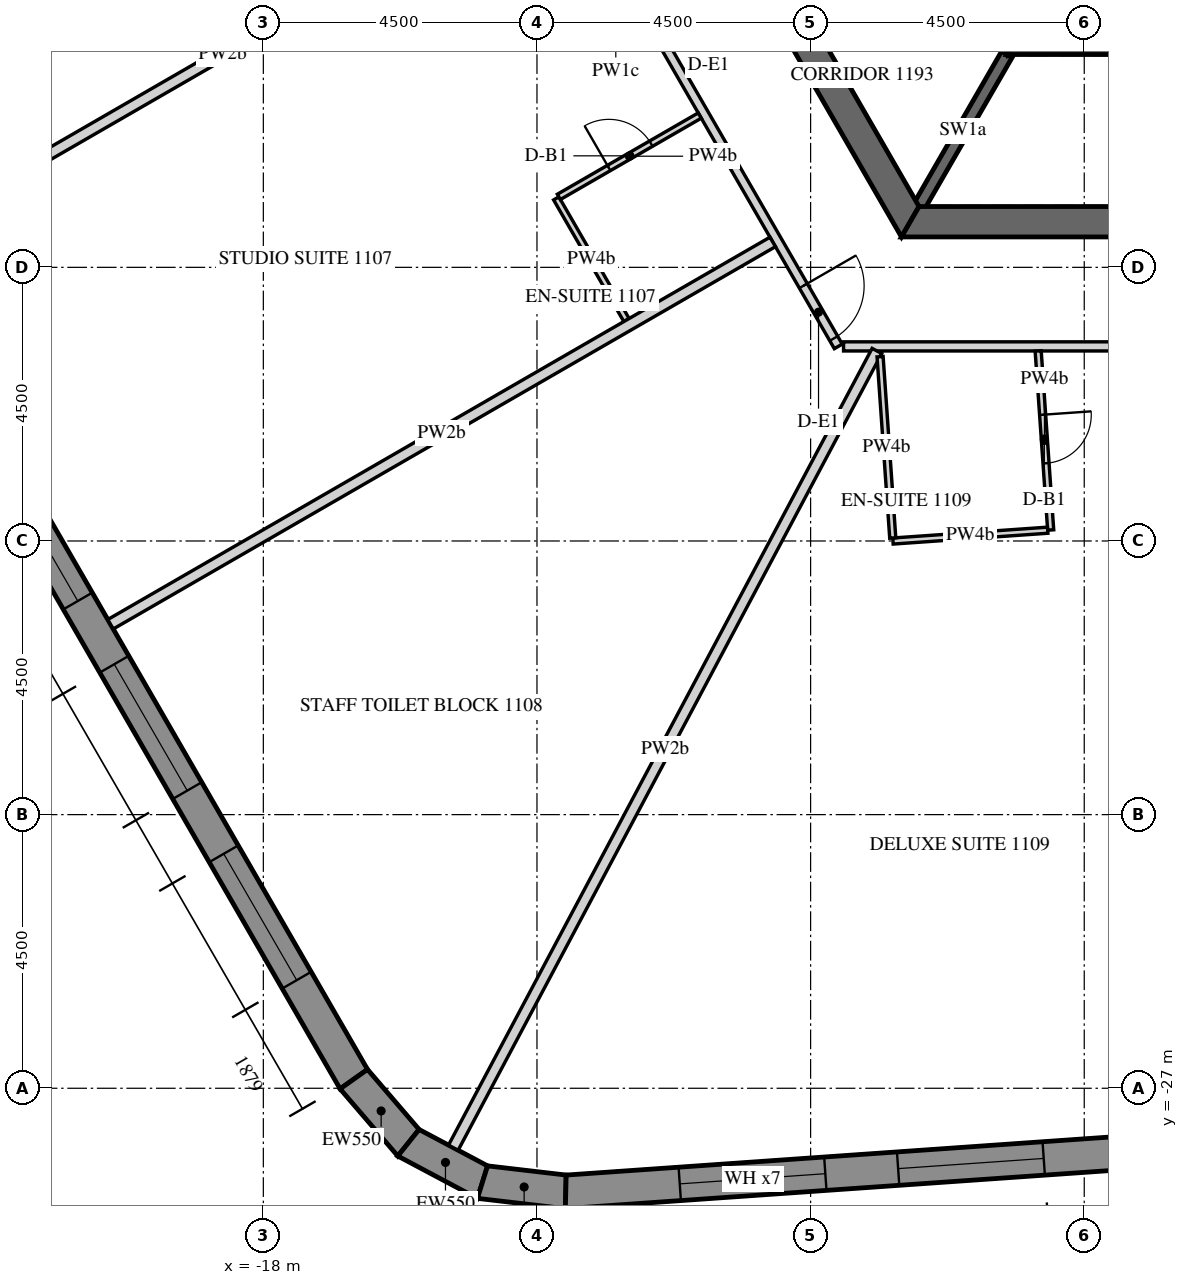
"""IFC4 building model, lengths in metres.
Left out: names, types, materials, properties, quantities, classifications, styles, units other than length and angle.
Written with IfcOpenShell. Run it as: python <this file> out.ifc"""

import sys

from ifc_helpers import new_model, si_unit, direction, frame, frame_2d, origin, place, context, subcontext, project, spatial, polyline, rectangle, outline, extrude, element, fill, save


model = new_model("IFC4")
c1 = context("Model", 3, precision=1e-05, world=origin(), true_north=direction((0.0, 1.0)))
c2 = subcontext(c1, "Body", "Model", "MODEL_VIEW")
j1 = project(units=[si_unit("LENGTHUNIT", "METRE"), si_unit("PLANEANGLEUNIT", "RADIAN")], contexts=[c1])
p1 = place(None, origin())
s1 = spatial("IfcSite", under=j1, at=p1, CompositionType="ELEMENT")
p2 = place(p1, origin())
s2 = spatial("IfcBuilding", under=s1, at=p2, CompositionType="ELEMENT")
p3 = place(p2, frame((0.0, 0.0, 156.6)))
s3 = spatial("IfcBuildingStorey", under=s2, at=p3, CompositionType="ELEMENT", Elevation=156.6)
p4 = place(p3, frame((-30.391, -2.811, -0.15), z_axis=(0.0, 0.0, 1.0), x_axis=(0.499998569178, -0.866026229868, 0.0)))
e1 = element("IfcWall", 1, at=p4, inside=s3, PredefinedType="SOLIDWALL", context=c2, shape_type="SweptSolid", body=[
    extrude(outline(polyline([(-0.022, -0.275), (27.783, -0.275), (27.732, 0.275), (0.022, 0.275), (-0.022, -0.275)])), origin(), (0.0, 0.0, 1.0), 3.9),
])
p5 = place(p4, frame((1.879, 0.0, 1.05)))
e2 = element("IfcOpeningElement", 2, at=p5, cuts=e1, PredefinedType="OPENING", context=c2, shape_type="SweptSolid", body=[
    extrude(rectangle(XDim=2.4, YDim=2.4, at=frame_2d((1.2, 1.2))), frame((0.0, 0.285, 0.0), z_axis=(0.0, -1.0, 0.0), x_axis=(1.0, 0.0, 0.0)), (0.0, 0.0, 1.0), 0.57),
])
p6 = place(p4, frame((5.479, 0.0, 1.05)))
e3 = element("IfcOpeningElement", 3, at=p6, cuts=e1, PredefinedType="OPENING", context=c2, shape_type="SweptSolid", body=[
    extrude(rectangle(XDim=2.4, YDim=2.4, at=frame_2d((1.2, 1.2))), frame((0.0, 0.285, 0.0), z_axis=(0.0, -1.0, 0.0), x_axis=(1.0, 0.0, 0.0)), (0.0, 0.0, 1.0), 0.57),
])
p7 = place(p4, frame((9.079, 0.0, 1.05)))
e4 = element("IfcOpeningElement", 4, at=p7, cuts=e1, PredefinedType="OPENING", context=c2, shape_type="SweptSolid", body=[
    extrude(rectangle(XDim=2.4, YDim=2.4, at=frame_2d((1.2, 1.2))), frame((0.0, 0.285, 0.0), z_axis=(0.0, -1.0, 0.0), x_axis=(1.0, 0.0, 0.0)), (0.0, 0.0, 1.0), 0.57),
])
p8 = place(p4, frame((12.679, 0.0, 1.05)))
e5 = element("IfcOpeningElement", 5, at=p8, cuts=e1, PredefinedType="OPENING", context=c2, shape_type="SweptSolid", body=[
    extrude(rectangle(XDim=2.4, YDim=2.4, at=frame_2d((1.2, 1.2))), frame((0.0, 0.285, 0.0), z_axis=(0.0, -1.0, 0.0), x_axis=(1.0, 0.0, 0.0)), (0.0, 0.0, 1.0), 0.57),
])
p9 = place(p4, frame((16.279, 0.0, 1.05)))
e6 = element("IfcOpeningElement", 6, at=p9, cuts=e1, PredefinedType="OPENING", context=c2, shape_type="SweptSolid", body=[
    extrude(rectangle(XDim=2.4, YDim=2.4, at=frame_2d((1.2, 1.2))), frame((0.0, 0.285, 0.0), z_axis=(0.0, -1.0, 0.0), x_axis=(1.0, 0.0, 0.0)), (0.0, 0.0, 1.0), 0.57),
])
p10 = place(p4, frame((19.879, 0.0, 1.05)))
e7 = element("IfcOpeningElement", 7, at=p10, cuts=e1, PredefinedType="OPENING", context=c2, shape_type="SweptSolid", body=[
    extrude(rectangle(XDim=2.4, YDim=2.4, at=frame_2d((1.2, 1.2))), frame((0.0, 0.285, 0.0), z_axis=(0.0, -1.0, 0.0), x_axis=(1.0, 0.0, 0.0)), (0.0, 0.0, 1.0), 0.57),
])
p11 = place(p4, frame((23.479, 0.0, 1.05)))
e8 = element("IfcOpeningElement", 8, at=p11, cuts=e1, PredefinedType="OPENING", context=c2, shape_type="SweptSolid", body=[
    extrude(rectangle(XDim=2.4, YDim=2.4, at=frame_2d((1.2, 1.2))), frame((0.0, 0.285, 0.0), z_axis=(0.0, -1.0, 0.0), x_axis=(1.0, 0.0, 0.0)), (0.0, 0.0, 1.0), 0.57),
])
p12 = place(p3, frame((-16.512, -26.85, -0.15), z_axis=(0.0, 0.0, 1.0), x_axis=(0.651621950847, -0.758543890078, 0.0)))
e9 = element("IfcWall", 9, at=p12, inside=s3, PredefinedType="SOLIDWALL", context=c2, shape_type="SweptSolid", body=[
    extrude(outline(polyline([(-0.026, -0.275), (1.431, -0.275), (1.327, 0.275), (0.026, 0.275), (-0.026, -0.275)])), origin(), (0.0, 0.0, 1.0), 3.9),
])
p13 = place(p3, frame((-15.614, -27.896, -0.15), z_axis=(0.0, 0.0, 1.0), x_axis=(0.882994189209, -0.469383917304, 0.0)))
e10 = element("IfcWall", 10, at=p13, inside=s3, PredefinedType="SOLIDWALL", context=c2, shape_type="SweptSolid", body=[
    extrude(outline(polyline([(-0.052, -0.275), (1.431, -0.275), (1.327, 0.275), (0.052, 0.275), (-0.052, -0.275)])), origin(), (0.0, 0.0, 1.0), 3.9),
])
p14 = place(p3, frame((-14.396, -28.543, -0.15), z_axis=(0.0, 0.0, 1.0), x_axis=(0.993232537394, -0.11614269956, 0.0)))
e11 = element("IfcWall", 11, at=p14, inside=s3, PredefinedType="SOLIDWALL", context=c2, shape_type="SweptSolid", body=[
    extrude(outline(polyline([(-0.052, -0.275), (1.405, -0.275), (1.353, 0.275), (0.052, 0.275), (-0.052, -0.275)])), origin(), (0.0, 0.0, 1.0), 3.9),
])
p15 = place(p3, frame((-13.026, -28.704, -0.15), z_axis=(0.0, 0.0, 1.0), x_axis=(0.99756406806, 0.069756219185, 0.0)))
e12 = element("IfcWall", 12, at=p15, inside=s3, PredefinedType="SOLIDWALL", context=c2, shape_type="SweptSolid", body=[
    extrude(outline(polyline([(-0.026, -0.275), (27.78, -0.275), (27.735, 0.275), (0.026, 0.275), (-0.026, -0.275)])), origin(), (0.0, 0.0, 1.0), 3.9),
])
p16 = place(p15, frame((1.879, 0.0, 1.05)))
e13 = element("IfcOpeningElement", 13, at=p16, cuts=e12, PredefinedType="OPENING", context=c2, shape_type="SweptSolid", body=[
    extrude(rectangle(XDim=2.4, YDim=2.4, at=frame_2d((1.2, 1.2))), frame((0.0, 0.285, 0.0), z_axis=(0.0, -1.0, 0.0), x_axis=(1.0, 0.0, 0.0)), (0.0, 0.0, 1.0), 0.57),
])
p17 = place(p15, frame((5.479, 0.0, 1.05)))
e14 = element("IfcOpeningElement", 14, at=p17, cuts=e12, PredefinedType="OPENING", context=c2, shape_type="SweptSolid", body=[
    extrude(rectangle(XDim=2.4, YDim=2.4, at=frame_2d((1.2, 1.2))), frame((0.0, 0.285, 0.0), z_axis=(0.0, -1.0, 0.0), x_axis=(1.0, 0.0, 0.0)), (0.0, 0.0, 1.0), 0.57),
])
p18 = place(p15, frame((9.079, 0.0, 1.05)))
e15 = element("IfcOpeningElement", 15, at=p18, cuts=e12, PredefinedType="OPENING", context=c2, shape_type="SweptSolid", body=[
    extrude(rectangle(XDim=2.4, YDim=2.4, at=frame_2d((1.2, 1.2))), frame((0.0, 0.285, 0.0), z_axis=(0.0, -1.0, 0.0), x_axis=(1.0, 0.0, 0.0)), (0.0, 0.0, 1.0), 0.57),
])
p19 = place(p15, frame((12.679, 0.0, 1.05)))
e16 = element("IfcOpeningElement", 16, at=p19, cuts=e12, PredefinedType="OPENING", context=c2, shape_type="SweptSolid", body=[
    extrude(rectangle(XDim=2.4, YDim=2.4, at=frame_2d((1.2, 1.2))), frame((0.0, 0.285, 0.0), z_axis=(0.0, -1.0, 0.0), x_axis=(1.0, 0.0, 0.0)), (0.0, 0.0, 1.0), 0.57),
])
p20 = place(p15, frame((16.279, 0.0, 1.05)))
e17 = element("IfcOpeningElement", 17, at=p20, cuts=e12, PredefinedType="OPENING", context=c2, shape_type="SweptSolid", body=[
    extrude(rectangle(XDim=2.4, YDim=2.4, at=frame_2d((1.2, 1.2))), frame((0.0, 0.285, 0.0), z_axis=(0.0, -1.0, 0.0), x_axis=(1.0, 0.0, 0.0)), (0.0, 0.0, 1.0), 0.57),
])
p21 = place(p15, frame((19.879, 0.0, 1.05)))
e18 = element("IfcOpeningElement", 18, at=p21, cuts=e12, PredefinedType="OPENING", context=c2, shape_type="SweptSolid", body=[
    extrude(rectangle(XDim=2.4, YDim=2.4, at=frame_2d((1.2, 1.2))), frame((0.0, 0.285, 0.0), z_axis=(0.0, -1.0, 0.0), x_axis=(1.0, 0.0, 0.0)), (0.0, 0.0, 1.0), 0.57),
])
p22 = place(p15, frame((23.479, 0.0, 1.05)))
e19 = element("IfcOpeningElement", 19, at=p22, cuts=e12, PredefinedType="OPENING", context=c2, shape_type="SweptSolid", body=[
    extrude(rectangle(XDim=2.4, YDim=2.4, at=frame_2d((1.2, 1.2))), frame((0.0, 0.285, 0.0), z_axis=(0.0, -1.0, 0.0), x_axis=(1.0, 0.0, 0.0)), (0.0, 0.0, 1.0), 0.57),
])
p23 = place(p3, frame((-14.722, 0.0, -0.15), z_axis=(0.0, 0.0, 1.0), x_axis=(0.50000571537, -0.866022103989, 0.0)))
e20 = element("IfcWall", 20, at=p23, inside=s3, PredefinedType="SHEAR", context=c2, shape_type="SweptSolid", body=[
    extrude(outline(polyline([(-0.144, -0.25), (14.867, -0.25), (14.578, 0.25), (0.144, 0.25), (-0.144, -0.25)])), origin(), (0.0, 0.0, 1.0), 3.9),
])
p24 = place(p23, frame((6.432, 0.0, 0.15)))
e21 = element("IfcOpeningElement", 21, at=p24, cuts=e20, PredefinedType="OPENING", context=c2, shape_type="SweptSolid", body=[
    extrude(rectangle(XDim=1.8, YDim=2.4, at=frame_2d((0.9, 1.2))), frame((0.0, 0.26, 0.0), z_axis=(0.0, -1.0, 0.0), x_axis=(1.0, 0.0, 0.0)), (0.0, 0.0, 1.0), 0.52),
])
p25 = place(p3, frame((-7.361, -12.75, -0.15), z_axis=(0.0, 0.0, 1.0), x_axis=(1.0, 0.0, 0.0)))
e22 = element("IfcWall", 22, at=p25, inside=s3, PredefinedType="SHEAR", context=c2, shape_type="SweptSolid", body=[
    extrude(outline(polyline([(-0.144, -0.25), (14.866, -0.25), (14.578, 0.25), (0.144, 0.25), (-0.144, -0.25)])), origin(), (0.0, 0.0, 1.0), 3.9),
])
p26 = place(p25, frame((6.761, 0.0, 0.15)))
e23 = element("IfcOpeningElement", 23, at=p26, cuts=e22, PredefinedType="OPENING", context=c2, shape_type="SweptSolid", body=[
    extrude(rectangle(XDim=1.2, YDim=2.4, at=frame_2d((0.6, 1.2))), frame((0.0, 0.26, 0.0), z_axis=(0.0, -1.0, 0.0), x_axis=(1.0, 0.0, 0.0)), (0.0, 0.0, 1.0), 0.52),
])
p27 = place(p3, frame((-11.345, 0.0, -0.15), z_axis=(0.0, 0.0, 1.0), x_axis=(0.499995046907, -0.866028263435, 0.0)))
e24 = element("IfcWall", 24, at=p27, inside=s3, PredefinedType="SHEAR", context=c2, shape_type="SweptSolid", body=[
    extrude(outline(polyline([(-0.101, -0.175), (11.446, -0.175), (11.244, 0.175), (0.101, 0.175), (-0.101, -0.175)])), origin(), (0.0, 0.0, 1.0), 3.9),
])
p28 = place(p27, frame((4.744, 0.0, 0.15)))
e25 = element("IfcOpeningElement", 25, at=p28, cuts=e24, PredefinedType="OPENING", context=c2, shape_type="SweptSolid", body=[
    extrude(rectangle(XDim=1.8, YDim=2.4, at=frame_2d((0.9, 1.2))), frame((0.0, 0.185, 0.0), z_axis=(0.0, -1.0, 0.0), x_axis=(1.0, 0.0, 0.0)), (0.0, 0.0, 1.0), 0.37),
])
p29 = place(p3, frame((-5.673, -9.825, -0.15), z_axis=(0.0, 0.0, 1.0), x_axis=(1.0, 0.0, 0.0)))
e26 = element("IfcWall", 26, at=p29, inside=s3, PredefinedType="SHEAR", context=c2, shape_type="SweptSolid", body=[
    extrude(outline(polyline([(-0.101, -0.175), (11.446, -0.175), (11.244, 0.175), (0.101, 0.175), (-0.101, -0.175)])), origin(), (0.0, 0.0, 1.0), 3.9),
])
p30 = place(p3, frame((-5.773, -10.0, -0.15), z_axis=(0.0, 0.0, 1.0), x_axis=(-0.499995765644, -0.866027848477, 0.0)))
e27 = element("IfcWall", 27, at=p30, inside=s3, PredefinedType="SHEAR", context=c2, shape_type="SweptSolid", body=[
    extrude(rectangle(XDim=2.887, YDim=0.2, at=frame_2d((1.443, 0.0))), origin(), (0.0, 0.0, 1.0), 3.9),
])
p31 = place(p3, frame((-15.863, -2.125, 0.0), z_axis=(0.0, 0.0, 1.0), x_axis=(0.500008833422, -0.866020303746, 0.0)))
e28 = element("IfcWall", 28, at=p31, inside=s3, PredefinedType="PARTITIONING", context=c2, shape_type="SweptSolid", body=[
    extrude(rectangle(XDim=14.636, YDim=0.15, at=frame_2d((7.318, 0.0))), origin(), (0.0, 0.0, 1.0), 2.823),
])
p32 = place(p31, frame((0.961, 0.0, 0.0)))
e29 = element("IfcOpeningElement", 29, at=p32, cuts=e28, PredefinedType="OPENING", context=c2, shape_type="SweptSolid", body=[
    extrude(rectangle(XDim=1.0, YDim=2.1, at=frame_2d((0.5, 1.05))), frame((0.0, 0.085, 0.0), z_axis=(0.0, -1.0, 0.0), x_axis=(1.0, 0.0, 0.0)), (0.0, 0.0, 1.0), 0.17),
])
p33 = place(p31, frame((7.309, 0.0, 0.0)))
e30 = element("IfcOpeningElement", 30, at=p33, cuts=e28, PredefinedType="OPENING", context=c2, shape_type="SweptSolid", body=[
    extrude(rectangle(XDim=1.0, YDim=2.1, at=frame_2d((0.5, 1.05))), frame((0.0, 0.085, 0.0), z_axis=(0.0, -1.0, 0.0), x_axis=(1.0, 0.0, 0.0)), (0.0, 0.0, 1.0), 0.17),
])
p34 = place(p31, frame((13.486, 0.0, 0.0)))
e31 = element("IfcOpeningElement", 31, at=p34, cuts=e28, PredefinedType="OPENING", context=c2, shape_type="SweptSolid", body=[
    extrude(rectangle(XDim=1.0, YDim=2.1, at=frame_2d((0.5, 1.05))), frame((0.0, 0.085, 0.0), z_axis=(0.0, -1.0, 0.0), x_axis=(1.0, 0.0, 0.0)), (0.0, 0.0, 1.0), 0.17),
])
p35 = place(p3, frame((-8.458, -14.8, 0.0), z_axis=(0.0, 0.0, 1.0), x_axis=(1.0, 0.0, 0.0)))
e32 = element("IfcWall", 32, at=p35, inside=s3, PredefinedType="PARTITIONING", context=c2, shape_type="SweptSolid", body=[
    extrude(rectangle(XDim=14.549, YDim=0.15, at=frame_2d((7.275, 0.0))), origin(), (0.0, 0.0, 1.0), 2.823),
])
p36 = place(p35, frame((4.375, 0.0, 0.0)))
e33 = element("IfcOpeningElement", 33, at=p36, cuts=e32, PredefinedType="OPENING", context=c2, shape_type="SweptSolid", body=[
    extrude(rectangle(XDim=1.0, YDim=2.1, at=frame_2d((0.5, 1.05))), frame((0.0, 0.085, 0.0), z_axis=(0.0, -1.0, 0.0), x_axis=(1.0, 0.0, 0.0)), (0.0, 0.0, 1.0), 0.17),
])
p37 = place(p35, frame((7.872, 0.0, 0.0)))
e34 = element("IfcOpeningElement", 34, at=p37, cuts=e32, PredefinedType="OPENING", context=c2, shape_type="SweptSolid", body=[
    extrude(rectangle(XDim=1.0, YDim=2.1, at=frame_2d((0.5, 1.05))), frame((0.0, 0.085, 0.0), z_axis=(0.0, -1.0, 0.0), x_axis=(1.0, 0.0, 0.0)), (0.0, 0.0, 1.0), 0.17),
])
p38 = place(p35, frame((10.609, 0.0, 0.0)))
e35 = element("IfcOpeningElement", 35, at=p38, cuts=e32, PredefinedType="OPENING", context=c2, shape_type="SweptSolid", body=[
    extrude(rectangle(XDim=1.0, YDim=2.1, at=frame_2d((0.5, 1.05))), frame((0.0, 0.085, 0.0), z_axis=(0.0, -1.0, 0.0), x_axis=(1.0, 0.0, 0.0)), (0.0, 0.0, 1.0), 0.17),
])
p39 = place(p3, frame((-19.158, -6.116, 0.0), z_axis=(0.0, 0.0, 1.0), x_axis=(-0.866021400173, -0.500006934395, 0.0)))
e36 = element("IfcWall", 36, at=p39, inside=s3, PredefinedType="PARTITIONING", context=c2, shape_type="SweptSolid", body=[
    extrude(rectangle(XDim=7.8, YDim=0.1, at=frame_2d((3.9, 0.0))), origin(), (0.0, 0.0, 1.0), 2.823),
])
p40 = place(p3, frame((-24.114, -13.134, 0.0), z_axis=(0.0, 0.0, 1.0), x_axis=(0.866024255907, 0.500001988177, 0.0)))
e37 = element("IfcWall", 37, at=p40, inside=s3, PredefinedType="PARTITIONING", context=c2, shape_type="SweptSolid", body=[
    extrude(rectangle(XDim=12.575, YDim=0.18, at=frame_2d((6.288, 0.0))), origin(), (0.0, 0.0, 1.0), 2.823),
])
p41 = place(p3, frame((-12.028, -14.367, 0.0), z_axis=(0.0, 0.0, 1.0), x_axis=(-0.500015210774, 0.866016621662, 0.0)))
e38 = element("IfcWall", 38, at=p41, inside=s3, PredefinedType="PARTITIONING", context=c2, shape_type="SweptSolid", body=[
    extrude(rectangle(XDim=2.31, YDim=0.1, at=frame_2d((1.155, 0.0))), origin(), (0.0, 0.0, 1.0), 2.823),
])
p42 = place(p3, frame((-13.14, -12.341, 0.0), z_axis=(0.0, 0.0, 1.0), x_axis=(0.86604424267, 0.499967368674, 0.0)))
e39 = element("IfcWall", 39, at=p42, inside=s3, PredefinedType="PARTITIONING", context=c2, shape_type="SweptSolid", body=[
    extrude(rectangle(XDim=2.675, YDim=0.1, at=frame_2d((1.337, 0.0))), origin(), (0.0, 0.0, 1.0), 2.823),
])
p43 = place(p42, frame((0.95, 0.0, 0.0)))
e40 = element("IfcOpeningElement", 40, at=p43, cuts=e39, PredefinedType="OPENING", context=c2, shape_type="SweptSolid", body=[
    extrude(rectangle(XDim=0.8, YDim=2.1, at=frame_2d((0.4, 1.05))), frame((0.0, 0.06, 0.0), z_axis=(0.0, -1.0, 0.0), x_axis=(1.0, 0.0, 0.0)), (0.0, 0.0, 1.0), 0.12),
])
p44 = place(p3, frame((-20.513, -19.37, 0.0), z_axis=(0.0, 0.0, 1.0), x_axis=(0.866019402111, 0.500010395058, 0.0)))
e41 = element("IfcWall", 41, at=p44, inside=s3, PredefinedType="PARTITIONING", context=c2, shape_type="SweptSolid", body=[
    extrude(rectangle(XDim=12.575, YDim=0.18, at=frame_2d((6.288, 0.0))), origin(), (0.0, 0.0, 1.0), 2.823),
])
p45 = place(p3, frame((-14.876, -27.977, 0.0), z_axis=(0.0, 0.0, 1.0), x_axis=(0.469475175214, 0.882945672088, 0.0)))
e42 = element("IfcWall", 42, at=p45, inside=s3, PredefinedType="PARTITIONING", context=c2, shape_type="SweptSolid", body=[
    extrude(rectangle(XDim=14.839, YDim=0.18, at=frame_2d((7.419, 0.0))), origin(), (0.0, 0.0, 1.0), 2.823),
])
p46 = place(p3, frame((-5.258, -14.875, 0.0), z_axis=(0.0, 0.0, 1.0), x_axis=(0.069812665072, -0.997560119389, 0.0)))
e43 = element("IfcWall", 43, at=p46, inside=s3, PredefinedType="PARTITIONING", context=c2, shape_type="SweptSolid", body=[
    extrude(rectangle(XDim=2.951, YDim=0.1, at=frame_2d((1.476, 0.0))), origin(), (0.0, 0.0, 1.0), 2.823),
])
p47 = place(p46, frame((1.052, 0.0, 0.0)))
e44 = element("IfcOpeningElement", 44, at=p47, cuts=e43, PredefinedType="OPENING", context=c2, shape_type="SweptSolid", body=[
    extrude(rectangle(XDim=0.8, YDim=2.1, at=frame_2d((0.4, 1.05))), frame((0.0, 0.06, 0.0), z_axis=(0.0, -1.0, 0.0), x_axis=(1.0, 0.0, 0.0)), (0.0, 0.0, 1.0), 0.12),
])
p48 = place(p3, frame((-5.102, -17.823, 0.0), z_axis=(0.0, 0.0, 1.0), x_axis=(-0.997561167558, -0.069797686069, 0.0)))
e45 = element("IfcWall", 45, at=p48, inside=s3, PredefinedType="PARTITIONING", context=c2, shape_type="SweptSolid", body=[
    extrude(rectangle(XDim=2.55, YDim=0.1, at=frame_2d((1.275, 0.0))), origin(), (0.0, 0.0, 1.0), 2.823),
])
p49 = place(p3, frame((-7.649, -17.951, 0.0), z_axis=(0.0, 0.0, 1.0), x_axis=(-0.069760844897, 0.997563744589, 0.0)))
e46 = element("IfcWall", 46, at=p49, inside=s3, PredefinedType="PARTITIONING", context=c2, shape_type="SweptSolid", body=[
    extrude(rectangle(XDim=2.989, YDim=0.1, at=frame_2d((1.494, 0.0))), origin(), (0.0, 0.0, 1.0), 2.823),
])
p50 = place(p9, frame((0.0, 0.205, 0.0)))
e47 = element("IfcWindow", 47, at=p50, inside=s3, PartitioningType="DOUBLE_PANEL_VERTICAL", PredefinedType="WINDOW", context=c2, shape_type="SweptSolid", body=[
    extrude(rectangle(XDim=2.4, YDim=2.4, at=frame_2d((1.2, 1.2))), frame((0.0, 0.03, 0.0), z_axis=(0.0, -1.0, 0.0), x_axis=(1.0, 0.0, 0.0)), (0.0, 0.0, 1.0), 0.06),
])
fill(e6, e47)
p51 = place(p10, frame((0.0, 0.205, 0.0)))
e48 = element("IfcWindow", 48, at=p51, inside=s3, PartitioningType="DOUBLE_PANEL_VERTICAL", PredefinedType="WINDOW", context=c2, shape_type="SweptSolid", body=[
    extrude(rectangle(XDim=2.4, YDim=2.4, at=frame_2d((1.2, 1.2))), frame((0.0, 0.03, 0.0), z_axis=(0.0, -1.0, 0.0), x_axis=(1.0, 0.0, 0.0)), (0.0, 0.0, 1.0), 0.06),
])
fill(e7, e48)
p52 = place(p11, frame((0.0, 0.205, 0.0)))
e49 = element("IfcWindow", 49, at=p52, inside=s3, PartitioningType="DOUBLE_PANEL_VERTICAL", PredefinedType="WINDOW", context=c2, shape_type="SweptSolid", body=[
    extrude(rectangle(XDim=2.4, YDim=2.4, at=frame_2d((1.2, 1.2))), frame((0.0, 0.03, 0.0), z_axis=(0.0, -1.0, 0.0), x_axis=(1.0, 0.0, 0.0)), (0.0, 0.0, 1.0), 0.06),
])
fill(e8, e49)
p53 = place(p16, frame((0.0, 0.205, 0.0)))
e50 = element("IfcWindow", 50, at=p53, inside=s3, PartitioningType="DOUBLE_PANEL_VERTICAL", PredefinedType="WINDOW", context=c2, shape_type="SweptSolid", body=[
    extrude(rectangle(XDim=2.4, YDim=2.4, at=frame_2d((1.2, 1.2))), frame((0.0, 0.03, 0.0), z_axis=(0.0, -1.0, 0.0), x_axis=(1.0, 0.0, 0.0)), (0.0, 0.0, 1.0), 0.06),
])
fill(e13, e50)
p54 = place(p17, frame((0.0, 0.205, 0.0)))
e51 = element("IfcWindow", 51, at=p54, inside=s3, PartitioningType="DOUBLE_PANEL_VERTICAL", PredefinedType="WINDOW", context=c2, shape_type="SweptSolid", body=[
    extrude(rectangle(XDim=2.4, YDim=2.4, at=frame_2d((1.2, 1.2))), frame((0.0, 0.03, 0.0), z_axis=(0.0, -1.0, 0.0), x_axis=(1.0, 0.0, 0.0)), (0.0, 0.0, 1.0), 0.06),
])
fill(e14, e51)
p55 = place(p43, origin())
e52 = element("IfcDoor", 52, at=p55, inside=s3, OperationType="SINGLE_SWING_RIGHT", PredefinedType="DOOR", context=c2, shape_type="SweptSolid", body=[
    extrude(rectangle(XDim=0.8, YDim=2.1, at=frame_2d((0.4, 1.05))), frame((0.0, 0.025, 0.0), z_axis=(0.0, -1.0, 0.0), x_axis=(1.0, 0.0, 0.0)), (0.0, 0.0, 1.0), 0.05),
])
fill(e40, e52)
p56 = place(p34, origin())
e53 = element("IfcDoor", 53, at=p56, inside=s3, OperationType="SINGLE_SWING_LEFT", PredefinedType="DOOR", context=c2, shape_type="SweptSolid", body=[
    extrude(rectangle(XDim=1.0, YDim=2.1, at=frame_2d((0.5, 1.05))), frame((0.0, 0.025, 0.0), z_axis=(0.0, -1.0, 0.0), x_axis=(1.0, 0.0, 0.0)), (0.0, 0.0, 1.0), 0.05),
])
fill(e31, e53)
p57 = place(p47, origin())
e54 = element("IfcDoor", 54, at=p57, inside=s3, OperationType="SINGLE_SWING_LEFT", PredefinedType="DOOR", context=c2, shape_type="SweptSolid", body=[
    extrude(rectangle(XDim=0.8, YDim=2.1, at=frame_2d((0.4, 1.05))), frame((0.0, 0.025, 0.0), z_axis=(0.0, -1.0, 0.0), x_axis=(1.0, 0.0, 0.0)), (0.0, 0.0, 1.0), 0.05),
])
fill(e44, e54)
save(model, sys.argv[1])
